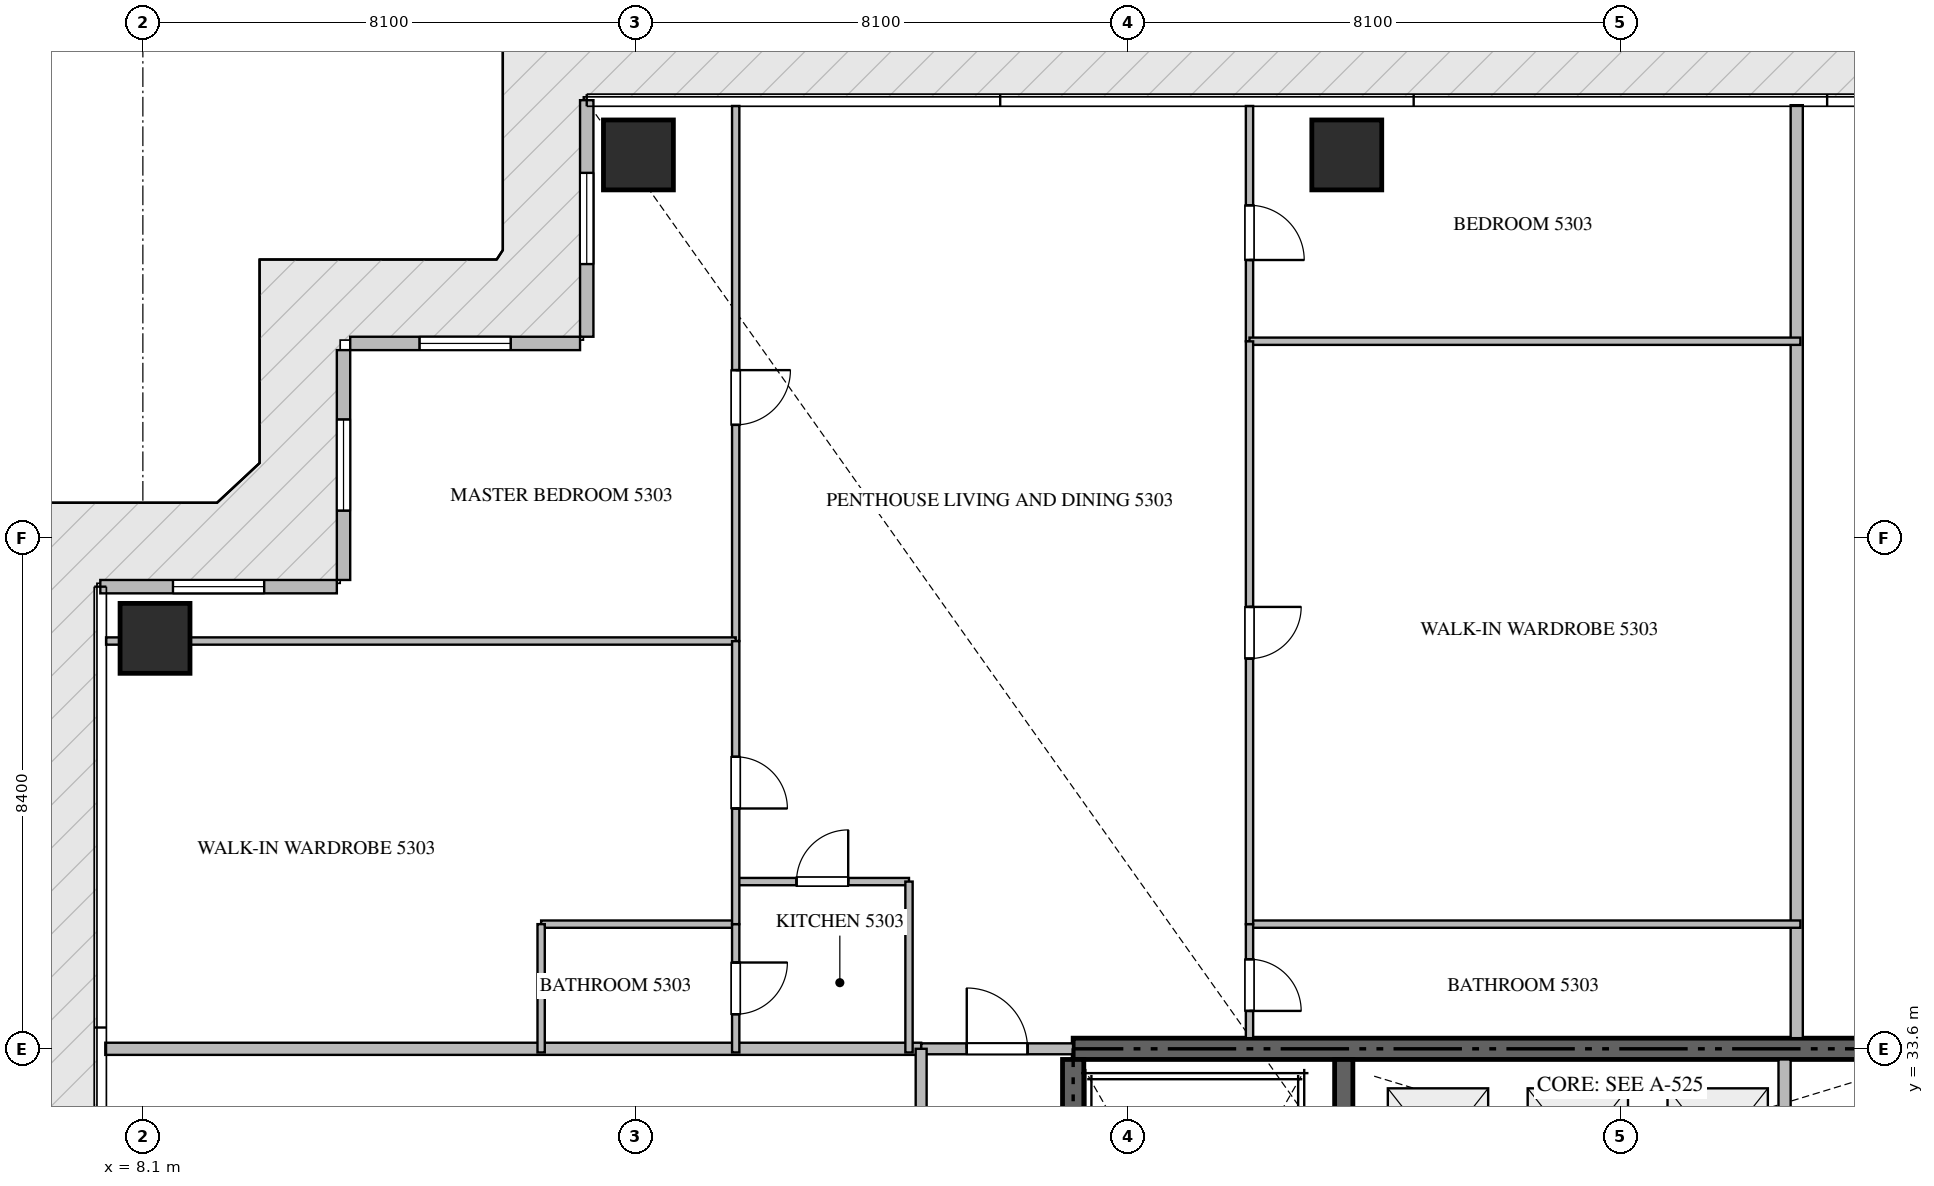
"""IFC4 building model, lengths in metres.
Left out: names, types, materials, properties, quantities, classifications, styles, units other than length and angle.
Written with IfcOpenShell. Run it as: python <this file> out.ifc"""

import sys

from ifc_helpers import new_model, si_unit, direction, frame, frame_2d, origin, origin_2d, place, context, subcontext, project, spatial, rectangle, extrude, source, transform, mapped, element, fill, save


model = new_model("IFC4")
c1 = context("Model", 3, precision=1e-05, world=origin(), true_north=direction((0.0, 1.0)))
c2 = subcontext(c1, "Body", "Model", "MODEL_VIEW")
j1 = project(units=[si_unit("LENGTHUNIT", "METRE"), si_unit("PLANEANGLEUNIT", "RADIAN")], contexts=[c1])
p1 = place(None, origin())
s1 = spatial("IfcSite", under=j1, at=p1, CompositionType="ELEMENT")
p2 = place(p1, origin())
s2 = spatial("IfcBuilding", under=s1, at=p2, CompositionType="ELEMENT")
p3 = place(p2, frame((0.0, 0.0, 214.3)))
s3 = spatial("IfcBuildingStorey", under=s2, at=p3, CompositionType="ELEMENT", Elevation=214.3)
p4 = place(p3, frame((41.4, 33.6, -0.26), z_axis=(0.0, 0.0, 1.0), x_axis=(-1.0, 0.0, 0.0)))
e1 = element("IfcWall", 1, at=p4, inside=s3, PredefinedType="SHEAR", context=c2, shape_type="SweptSolid", body=[
    extrude(rectangle(XDim=18.0, YDim=0.35, at=frame_2d((9.0, 0.0))), origin(), (0.0, 0.0, 1.0), 3.848),
])
p5 = place(p3, frame((23.4, 24.25, -0.26), z_axis=(0.0, 0.0, 1.0), x_axis=(0.0, 1.0, 0.0)))
e2 = element("IfcWall", 2, at=p5, inside=s3, PredefinedType="SHEAR", context=c2, shape_type="SweptSolid", body=[
    extrude(rectangle(XDim=9.175, YDim=0.35, at=frame_2d((4.587, 0.0))), origin(), (0.0, 0.0, 1.0), 3.848),
])
p6 = place(p3, frame((27.85, 23.55, -0.26), z_axis=(0.0, 0.0, 1.0), x_axis=(0.0, 1.0, 0.0)))
e3 = element("IfcWall", 3, at=p6, inside=s3, PredefinedType="SHEAR", context=c2, shape_type="SweptSolid", body=[
    extrude(rectangle(XDim=9.875, YDim=0.3, at=frame_2d((4.938, 0.0))), origin(), (0.0, 0.0, 1.0), 3.848),
])
m1 = source(origin(), c2, "Body", "SweptSolid", [
    extrude(rectangle(XDim=1.15, YDim=1.15, at=origin_2d()), origin(), (0.0, 0.0, 1.0), 3.85),
])
for number, where, z_axis, x_axis in (
    (4, (16.25, 48.3, -0.26), (0.0, 0.0, 1.0), (1.0, 0.0, 0.0)),
    (5, (27.9, 48.3, -0.26), (0.0, 0.0, 1.0), (1.0, 0.0, 0.0)),
    (6, (8.3, 40.35, -0.26), (0.0, 0.0, 1.0), (1.0, 0.0, 0.0)),
):
    element("IfcColumn", number, at=place(p3, frame(where, z_axis=z_axis, x_axis=x_axis)), inside=s3, PredefinedType="COLUMN", context=c2, shape_type="MappedRepresentation", body=[
        mapped(m1, transform((0.0, 0.0, 0.0), scale=1.0)),
    ])
p7 = place(p3, frame((15.4, 49.2, 0.0), z_axis=(0.0, 0.0, 1.0), x_axis=(0.0, -1.0, 0.0)))
e7 = element("IfcWall", 7, at=p7, inside=s3, PredefinedType="ELEMENTEDWALL", context=c2, shape_type="SweptSolid", body=[
    extrude(rectangle(XDim=3.89, YDim=0.22, at=frame_2d((1.945, 0.0))), origin(), (0.0, 0.0, 1.0), 3.575),
])
p8 = place(p7, frame((1.195, 0.0, 0.65)))
e8 = element("IfcOpeningElement", 8, at=p8, cuts=e7, PredefinedType="OPENING", context=c2, shape_type="SweptSolid", body=[
    extrude(rectangle(XDim=1.5, YDim=2.25, at=frame_2d((0.75, 1.125))), frame((0.0, 0.12, 0.0), z_axis=(0.0, -1.0, 0.0), x_axis=(1.0, 0.0, 0.0)), (0.0, 0.0, 1.0), 0.24),
])
p9 = place(p3, frame((15.29, 45.2, 0.0), z_axis=(0.0, 0.0, 1.0), x_axis=(-1.0, 0.0, 0.0)))
e9 = element("IfcWall", 9, at=p9, inside=s3, PredefinedType="ELEMENTEDWALL", context=c2, shape_type="SweptSolid", body=[
    extrude(rectangle(XDim=3.78, YDim=0.22, at=frame_2d((1.89, 0.0))), origin(), (0.0, 0.0, 1.0), 3.575),
])
p10 = place(p9, frame((1.14, 0.0, 0.65)))
e10 = element("IfcOpeningElement", 10, at=p10, cuts=e9, PredefinedType="OPENING", context=c2, shape_type="SweptSolid", body=[
    extrude(rectangle(XDim=1.5, YDim=2.25, at=frame_2d((0.75, 1.125))), frame((0.0, 0.12, 0.0), z_axis=(0.0, -1.0, 0.0), x_axis=(1.0, 0.0, 0.0)), (0.0, 0.0, 1.0), 0.24),
])
p11 = place(p3, frame((11.4, 45.09, 0.0), z_axis=(0.0, 0.0, 1.0), x_axis=(0.0, -1.0, 0.0)))
e11 = element("IfcWall", 11, at=p11, inside=s3, PredefinedType="ELEMENTEDWALL", context=c2, shape_type="SweptSolid", body=[
    extrude(rectangle(XDim=3.78, YDim=0.22, at=frame_2d((1.89, 0.0))), origin(), (0.0, 0.0, 1.0), 3.575),
])
p12 = place(p11, frame((1.14, 0.0, 0.65)))
e12 = element("IfcOpeningElement", 12, at=p12, cuts=e11, PredefinedType="OPENING", context=c2, shape_type="SweptSolid", body=[
    extrude(rectangle(XDim=1.5, YDim=2.25, at=frame_2d((0.75, 1.125))), frame((0.0, 0.12, 0.0), z_axis=(0.0, -1.0, 0.0), x_axis=(1.0, 0.0, 0.0)), (0.0, 0.0, 1.0), 0.24),
])
p13 = place(p3, frame((11.29, 41.2, 0.0), z_axis=(0.0, 0.0, 1.0), x_axis=(-1.0, 0.0, 0.0)))
e13 = element("IfcWall", 13, at=p13, inside=s3, PredefinedType="ELEMENTEDWALL", context=c2, shape_type="SweptSolid", body=[
    extrude(rectangle(XDim=3.89, YDim=0.22, at=frame_2d((1.945, 0.0))), origin(), (0.0, 0.0, 1.0), 3.575),
])
p14 = place(p13, frame((1.195, 0.0, 0.65)))
e14 = element("IfcOpeningElement", 14, at=p14, cuts=e13, PredefinedType="OPENING", context=c2, shape_type="SweptSolid", body=[
    extrude(rectangle(XDim=1.5, YDim=2.25, at=frame_2d((0.75, 1.125))), frame((0.0, 0.12, 0.0), z_axis=(0.0, -1.0, 0.0), x_axis=(1.0, 0.0, 0.0)), (0.0, 0.0, 1.0), 0.24),
])
p15 = place(p3, frame((35.1, 30.75, 0.0), z_axis=(0.0, 0.0, 1.0), x_axis=(0.0, 1.0, 0.0)))
e15 = element("IfcWall", 15, at=p15, inside=s3, PredefinedType="STANDARD", context=c2, shape_type="SweptSolid", body=[
    extrude(rectangle(XDim=2.675, YDim=0.2, at=frame_2d((1.337, 0.0))), origin(), (0.0, 0.0, 1.0), 3.59),
])
p16 = place(p3, frame((35.3, 33.775, 0.0), z_axis=(0.0, 0.0, 1.0), x_axis=(0.0, 1.0, 0.0)))
e16 = element("IfcWall", 16, at=p16, inside=s3, PredefinedType="PARTITIONING", context=c2, shape_type="SweptSolid", body=[
    extrude(rectangle(XDim=15.343, YDim=0.2, at=frame_2d((7.671, 0.0))), origin(), (0.0, 0.0, 1.0), 3.59),
])
p17 = place(p3, frame((7.482, 33.6, 0.0), z_axis=(0.0, 0.0, 1.0), x_axis=(1.0, 0.0, 0.0)))
e17 = element("IfcWall", 17, at=p17, inside=s3, PredefinedType="PARTITIONING", context=c2, shape_type="SweptSolid", body=[
    extrude(rectangle(XDim=13.418, YDim=0.2, at=frame_2d((6.709, 0.0))), origin(), (0.0, 0.0, 1.0), 3.59),
])
p18 = place(p3, frame((20.902, 33.6, 0.0), z_axis=(0.0, 0.0, 1.0), x_axis=(1.0, 0.0, 0.0)))
e18 = element("IfcWall", 18, at=p18, inside=s3, PredefinedType="PARTITIONING", context=c2, shape_type="SweptSolid", body=[
    extrude(rectangle(XDim=2.496, YDim=0.18, at=frame_2d((1.248, 0.0))), origin(), (0.0, 0.0, 1.0), 3.59),
])
p19 = place(p18, frame((0.748, 0.0, 0.0)))
e19 = element("IfcOpeningElement", 19, at=p19, cuts=e18, PredefinedType="OPENING", context=c2, shape_type="SweptSolid", body=[
    extrude(rectangle(XDim=1.0, YDim=2.15, at=frame_2d((0.5, 1.075))), frame((0.0, 0.1, 0.0), z_axis=(0.0, -1.0, 0.0), x_axis=(1.0, 0.0, 0.0)), (0.0, 0.0, 1.0), 0.2),
])
p20 = place(p3, frame((20.9, 16.8, 0.0), z_axis=(0.0, 0.0, 1.0), x_axis=(0.0, 1.0, 0.0)))
e20 = element("IfcWall", 20, at=p20, inside=s3, PredefinedType="PARTITIONING", context=c2, shape_type="SweptSolid", body=[
    extrude(rectangle(XDim=16.8, YDim=0.18, at=frame_2d((8.4, 0.0))), origin(), (0.0, 0.0, 1.0), 3.59),
])
p21 = place(p20, frame((14.5, 0.0, 0.0)))
e21 = element("IfcOpeningElement", 21, at=p21, cuts=e20, PredefinedType="OPENING", context=c2, shape_type="SweptSolid", body=[
    extrude(rectangle(XDim=1.0, YDim=2.15, at=frame_2d((0.5, 1.075))), frame((0.0, 0.1, 0.0), z_axis=(0.0, -1.0, 0.0), x_axis=(1.0, 0.0, 0.0)), (0.0, 0.0, 1.0), 0.2),
])
p22 = place(p3, frame((17.85, 36.35, 0.0), z_axis=(0.0, 0.0, 1.0), x_axis=(1.0, 0.0, 0.0)))
e22 = element("IfcWall", 22, at=p22, inside=s3, PredefinedType="PARTITIONING", context=c2, shape_type="SweptSolid", body=[
    extrude(rectangle(XDim=2.85, YDim=0.12, at=frame_2d((1.425, 0.0))), origin(), (0.0, 0.0, 1.0), 3.59),
])
p23 = place(p22, frame((1.0, 0.0, 0.0)))
e23 = element("IfcOpeningElement", 23, at=p23, cuts=e22, PredefinedType="OPENING", context=c2, shape_type="SweptSolid", body=[
    extrude(rectangle(XDim=0.85, YDim=2.1, at=frame_2d((0.425, 1.05))), frame((0.0, 0.07, 0.0), z_axis=(0.0, -1.0, 0.0), x_axis=(1.0, 0.0, 0.0)), (0.0, 0.0, 1.0), 0.14),
])
p24 = place(p3, frame((20.7, 36.35, 0.0), z_axis=(0.0, 0.0, 1.0), x_axis=(0.0, -1.0, 0.0)))
e24 = element("IfcWall", 24, at=p24, inside=s3, PredefinedType="PARTITIONING", context=c2, shape_type="SweptSolid", body=[
    extrude(rectangle(XDim=2.81, YDim=0.12, at=frame_2d((1.405, 0.0))), origin(), (0.0, 0.0, 1.0), 3.59),
])
p25 = place(p3, frame((17.85, 49.105, 0.0), z_axis=(0.0, 0.0, 1.0), x_axis=(0.0, -1.0, 0.0)))
e25 = element("IfcWall", 25, at=p25, inside=s3, PredefinedType="PARTITIONING", context=c2, shape_type="SweptSolid", body=[
    extrude(rectangle(XDim=8.799, YDim=0.12, at=frame_2d((4.399, 0.0))), origin(), (0.0, 0.0, 1.0), 3.59),
])
p26 = place(p25, frame((4.344, 0.0, 0.0)))
e26 = element("IfcOpeningElement", 26, at=p26, cuts=e25, PredefinedType="OPENING", context=c2, shape_type="SweptSolid", body=[
    extrude(rectangle(XDim=0.9, YDim=2.1, at=frame_2d((0.45, 1.05))), frame((0.0, 0.07, 0.0), z_axis=(0.0, -1.0, 0.0), x_axis=(1.0, 0.0, 0.0)), (0.0, 0.0, 1.0), 0.14),
])
p27 = place(p3, frame((7.495, 40.306, 0.0), z_axis=(0.0, 0.0, 1.0), x_axis=(1.0, 0.0, 0.0)))
e27 = element("IfcWall", 27, at=p27, inside=s3, PredefinedType="PARTITIONING", context=c2, shape_type="SweptSolid", body=[
    extrude(rectangle(XDim=10.355, YDim=0.12, at=frame_2d((5.177, 0.0))), origin(), (0.0, 0.0, 1.0), 3.122),
])
p28 = place(p3, frame((14.65, 35.65, 0.0), z_axis=(0.0, 0.0, 1.0), x_axis=(1.0, 0.0, 0.0)))
e28 = element("IfcWall", 28, at=p28, inside=s3, PredefinedType="PARTITIONING", context=c2, shape_type="SweptSolid", body=[
    extrude(rectangle(XDim=3.2, YDim=0.12, at=frame_2d((1.6, 0.0))), origin(), (0.0, 0.0, 1.0), 3.59),
])
p29 = place(p3, frame((14.65, 35.65, 0.0), z_axis=(0.0, 0.0, 1.0), x_axis=(0.0, -1.0, 0.0)))
e29 = element("IfcWall", 29, at=p29, inside=s3, PredefinedType="PARTITIONING", context=c2, shape_type="SweptSolid", body=[
    extrude(rectangle(XDim=2.11, YDim=0.12, at=frame_2d((1.055, 0.0))), origin(), (0.0, 0.0, 1.0), 3.59),
])
p30 = place(p3, frame((17.85, 40.304, 0.0), z_axis=(0.0, 0.0, 1.0), x_axis=(0.0, -1.0, 0.0)))
e30 = element("IfcWall", 30, at=p30, inside=s3, PredefinedType="PARTITIONING", context=c2, shape_type="SweptSolid", body=[
    extrude(rectangle(XDim=4.654, YDim=0.12, at=frame_2d((2.327, 0.0))), origin(), (0.0, 0.0, 1.0), 3.59),
])
p31 = place(p30, frame((1.902, 0.0, 0.0)))
e31 = element("IfcOpeningElement", 31, at=p31, cuts=e30, PredefinedType="OPENING", context=c2, shape_type="SweptSolid", body=[
    extrude(rectangle(XDim=0.85, YDim=2.1, at=frame_2d((0.425, 1.05))), frame((0.0, 0.07, 0.0), z_axis=(0.0, -1.0, 0.0), x_axis=(1.0, 0.0, 0.0)), (0.0, 0.0, 1.0), 0.14),
])
p32 = place(p3, frame((17.85, 35.648, 0.0), z_axis=(0.0, 0.0, 1.0), x_axis=(0.0, -1.0, 0.0)))
e32 = element("IfcWall", 32, at=p32, inside=s3, PredefinedType="PARTITIONING", context=c2, shape_type="SweptSolid", body=[
    extrude(rectangle(XDim=2.108, YDim=0.12, at=frame_2d((1.054, 0.0))), origin(), (0.0, 0.0, 1.0), 3.59),
])
p33 = place(p32, frame((0.629, 0.0, 0.0)))
e33 = element("IfcOpeningElement", 33, at=p33, cuts=e32, PredefinedType="OPENING", context=c2, shape_type="SweptSolid", body=[
    extrude(rectangle(XDim=0.85, YDim=2.1, at=frame_2d((0.425, 1.05))), frame((0.0, 0.07, 0.0), z_axis=(0.0, -1.0, 0.0), x_axis=(1.0, 0.0, 0.0)), (0.0, 0.0, 1.0), 0.14),
])
p34 = place(p3, frame((26.3, 49.105, 0.0), z_axis=(0.0, 0.0, 1.0), x_axis=(0.0, -1.0, 0.0)))
e34 = element("IfcWall", 34, at=p34, inside=s3, PredefinedType="PARTITIONING", context=c2, shape_type="SweptSolid", body=[
    extrude(rectangle(XDim=3.869, YDim=0.12, at=frame_2d((1.935, 0.0))), origin(), (0.0, 0.0, 1.0), 3.59),
])
p35 = place(p34, frame((1.633, 0.0, 0.0)))
e35 = element("IfcOpeningElement", 35, at=p35, cuts=e34, PredefinedType="OPENING", context=c2, shape_type="SweptSolid", body=[
    extrude(rectangle(XDim=0.9, YDim=2.1, at=frame_2d((0.45, 1.05))), frame((0.0, 0.07, 0.0), z_axis=(0.0, -1.0, 0.0), x_axis=(1.0, 0.0, 0.0)), (0.0, 0.0, 1.0), 0.14),
])
for number, where, z_axis, x_axis in (
    (36, (26.3, 45.236, 0.0), (0.0, 0.0, 1.0), (1.0, 0.0, 0.0)),
    (37, (26.3, 35.65, 0.0), (0.0, 0.0, 1.0), (1.0, 0.0, 0.0)),
):
    element("IfcWall", number, at=place(p3, frame(where, z_axis=z_axis, x_axis=x_axis)), inside=s3, PredefinedType="PARTITIONING", context=c2, shape_type="SweptSolid", body=[
        extrude(rectangle(XDim=9.06, YDim=0.12, at=frame_2d((4.53, 0.0))), origin(), (0.0, 0.0, 1.0), 3.59),
    ])
p36 = place(p3, frame((26.3, 45.234, 0.0), z_axis=(0.0, 0.0, 1.0), x_axis=(0.0, -1.0, 0.0)))
e38 = element("IfcWall", 38, at=p36, inside=s3, PredefinedType="PARTITIONING", context=c2, shape_type="SweptSolid", body=[
    extrude(rectangle(XDim=9.584, YDim=0.12, at=frame_2d((4.792, 0.0))), origin(), (0.0, 0.0, 1.0), 3.59),
])
p37 = place(p36, frame((4.367, 0.0, 0.0)))
e39 = element("IfcOpeningElement", 39, at=p37, cuts=e38, PredefinedType="OPENING", context=c2, shape_type="SweptSolid", body=[
    extrude(rectangle(XDim=0.85, YDim=2.1, at=frame_2d((0.425, 1.05))), frame((0.0, 0.07, 0.0), z_axis=(0.0, -1.0, 0.0), x_axis=(1.0, 0.0, 0.0)), (0.0, 0.0, 1.0), 0.14),
])
p38 = place(p3, frame((26.3, 35.648, 0.0), z_axis=(0.0, 0.0, 1.0), x_axis=(0.0, -1.0, 0.0)))
e40 = element("IfcWall", 40, at=p38, inside=s3, PredefinedType="PARTITIONING", context=c2, shape_type="SweptSolid", body=[
    extrude(rectangle(XDim=1.873, YDim=0.12, at=frame_2d((0.937, 0.0))), origin(), (0.0, 0.0, 1.0), 3.59),
])
p39 = place(p38, frame((0.575, 0.0, 0.0)))
e41 = element("IfcOpeningElement", 41, at=p39, cuts=e40, PredefinedType="OPENING", context=c2, shape_type="SweptSolid", body=[
    extrude(rectangle(XDim=0.85, YDim=2.1, at=frame_2d((0.425, 1.05))), frame((0.0, 0.07, 0.0), z_axis=(0.0, -1.0, 0.0), x_axis=(1.0, 0.0, 0.0)), (0.0, 0.0, 1.0), 0.14),
])
m2 = source(origin(), c2, "Body", "SweptSolid", [
    extrude(rectangle(XDim=1.5, YDim=2.25, at=frame_2d((0.75, 1.125))), frame((0.0, 0.03, 0.0), z_axis=(0.0, -1.0, 0.0), x_axis=(1.0, 0.0, 0.0)), (0.0, 0.0, 1.0), 0.06),
])
p40 = place(p8, origin())
e42 = element("IfcWindow", 42, at=p40, inside=s3, PartitioningType="SINGLE_PANEL", PredefinedType="WINDOW", context=c2, shape_type="MappedRepresentation", body=[
    mapped(m2, transform((0.0, 0.0, 0.0), scale=1.0)),
])
fill(e8, e42)
p41 = place(p10, origin())
e43 = element("IfcWindow", 43, at=p41, inside=s3, PartitioningType="SINGLE_PANEL", PredefinedType="WINDOW", context=c2, shape_type="MappedRepresentation", body=[
    mapped(m2, transform((0.0, 0.0, 0.0), scale=1.0)),
])
fill(e10, e43)
p42 = place(p12, origin())
e44 = element("IfcWindow", 44, at=p42, inside=s3, PartitioningType="SINGLE_PANEL", PredefinedType="WINDOW", context=c2, shape_type="MappedRepresentation", body=[
    mapped(m2, transform((0.0, 0.0, 0.0), scale=1.0)),
])
fill(e12, e44)
p43 = place(p14, origin())
e45 = element("IfcWindow", 45, at=p43, inside=s3, PartitioningType="SINGLE_PANEL", PredefinedType="WINDOW", context=c2, shape_type="MappedRepresentation", body=[
    mapped(m2, transform((0.0, 0.0, 0.0), scale=1.0)),
])
fill(e14, e45)
m3 = source(origin(), c2, "Body", "SweptSolid", [
    extrude(rectangle(XDim=1.0, YDim=2.15, at=frame_2d((0.5, 1.075))), frame((0.0, 0.025, 0.0), z_axis=(0.0, -1.0, 0.0), x_axis=(1.0, 0.0, 0.0)), (0.0, 0.0, 1.0), 0.05),
])
p44 = place(p19, origin())
e46 = element("IfcDoor", 46, at=p44, inside=s3, OperationType="SINGLE_SWING_LEFT", PredefinedType="DOOR", context=c2, shape_type="MappedRepresentation", body=[
    mapped(m3, transform((0.0, 0.0, 0.0), scale=1.0)),
])
fill(e19, e46)
m4 = source(origin(), c2, "Body", "SweptSolid", [
    extrude(rectangle(XDim=0.85, YDim=2.1, at=frame_2d((0.425, 1.05))), frame((0.0, 0.025, 0.0), z_axis=(0.0, -1.0, 0.0), x_axis=(1.0, 0.0, 0.0)), (0.0, 0.0, 1.0), 0.05),
])
p45 = place(p23, origin())
e47 = element("IfcDoor", 47, at=p45, inside=s3, OperationType="SINGLE_SWING_RIGHT", PredefinedType="DOOR", context=c2, shape_type="MappedRepresentation", body=[
    mapped(m4, transform((0.0, 0.0, 0.0), scale=1.0)),
])
fill(e23, e47)
m5 = source(origin(), c2, "Body", "SweptSolid", [
    extrude(rectangle(XDim=0.9, YDim=2.1, at=frame_2d((0.45, 1.05))), frame((0.0, 0.025, 0.0), z_axis=(0.0, -1.0, 0.0), x_axis=(1.0, 0.0, 0.0)), (0.0, 0.0, 1.0), 0.05),
])
p46 = place(p26, origin())
e48 = element("IfcDoor", 48, at=p46, inside=s3, OperationType="SINGLE_SWING_LEFT", PredefinedType="DOOR", context=c2, shape_type="MappedRepresentation", body=[
    mapped(m5, transform((0.0, 0.0, 0.0), scale=1.0)),
])
fill(e26, e48)
p47 = place(p31, origin())
e49 = element("IfcDoor", 49, at=p47, inside=s3, OperationType="SINGLE_SWING_RIGHT", PredefinedType="DOOR", context=c2, shape_type="MappedRepresentation", body=[
    mapped(m4, transform((0.0, 0.0, 0.0), scale=1.0)),
])
fill(e31, e49)
p48 = place(p33, origin())
e50 = element("IfcDoor", 50, at=p48, inside=s3, OperationType="SINGLE_SWING_LEFT", PredefinedType="DOOR", context=c2, shape_type="MappedRepresentation", body=[
    mapped(m4, transform((0.0, 0.0, 0.0), scale=1.0)),
])
fill(e33, e50)
p49 = place(p35, origin())
e51 = element("IfcDoor", 51, at=p49, inside=s3, OperationType="SINGLE_SWING_RIGHT", PredefinedType="DOOR", context=c2, shape_type="MappedRepresentation", body=[
    mapped(m5, transform((0.0, 0.0, 0.0), scale=1.0)),
])
fill(e35, e51)
p50 = place(p37, origin())
e52 = element("IfcDoor", 52, at=p50, inside=s3, OperationType="SINGLE_SWING_LEFT", PredefinedType="DOOR", context=c2, shape_type="MappedRepresentation", body=[
    mapped(m4, transform((0.0, 0.0, 0.0), scale=1.0)),
])
fill(e39, e52)
p51 = place(p39, origin())
e53 = element("IfcDoor", 53, at=p51, inside=s3, OperationType="SINGLE_SWING_RIGHT", PredefinedType="DOOR", context=c2, shape_type="MappedRepresentation", body=[
    mapped(m4, transform((0.0, 0.0, 0.0), scale=1.0)),
])
fill(e41, e53)
save(model, sys.argv[1])
